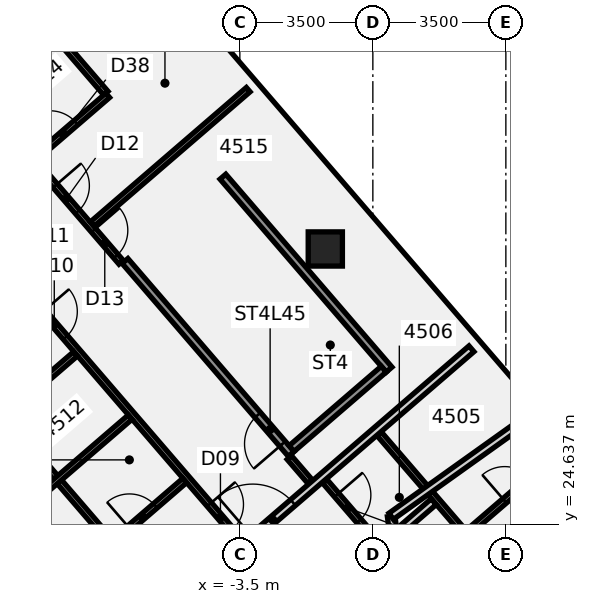
"""IFC4 building model, lengths in metres.
Left out: names, types, materials, properties, quantities, classifications, styles, units other than length and angle.
Written with IfcOpenShell. Run it as: python <this file> out.ifc"""

import sys

from ifc_helpers import new_model, si_unit, direction, frame, frame_2d, origin, origin_2d, place, context, subcontext, project, spatial, polyline, rectangle, outline, extrude, element, fill, save


model = new_model("IFC4")
c1 = context("Model", 3, precision=1e-05, world=origin(), true_north=direction((0.0, 1.0)))
c2 = subcontext(c1, "Body", "Model", "MODEL_VIEW")
j1 = project(units=[si_unit("LENGTHUNIT", "METRE"), si_unit("PLANEANGLEUNIT", "RADIAN")], contexts=[c1])
p1 = place(None, origin())
s1 = spatial("IfcSite", under=j1, at=p1, CompositionType="ELEMENT")
p2 = place(p1, origin())
s2 = spatial("IfcBuilding", under=s1, at=p2, CompositionType="ELEMENT")
p3 = place(p2, frame((0.0, 0.0, 182.5)))
s3 = spatial("IfcBuildingStorey", under=s2, at=p3, CompositionType="ELEMENT", Elevation=182.5)
p4 = place(p3, frame((-1.251, 31.878, -0.135), z_axis=(-0.049929700814, -0.006783926741, 0.99872969482), x_axis=(0.652013787216, -0.757710068374, 0.027449472935)))
e1 = element("IfcColumn", 1, at=p4, inside=s3, PredefinedType="COLUMN", context=c2, shape_type="SweptSolid", body=[
    extrude(rectangle(XDim=0.9, YDim=0.9, at=origin_2d()), origin(), (0.0, 0.0, 1.0), 3.599),
])
p5 = place(p3, frame((-9.706, 27.443, 0.0), z_axis=(0.0, 0.0, 1.0), x_axis=(0.652665803923, -0.757645925475, 0.0)))
e2 = element("IfcWall", 2, at=p5, inside=s3, PredefinedType="PARTITIONING", context=c2, shape_type="SweptSolid", body=[
    extrude(rectangle(XDim=4.34, YDim=0.15, at=frame_2d((2.17, 0.0))), origin(), (0.0, 0.0, 1.0), 2.864),
])
p6 = place(p3, frame((-12.149, 34.262, 0.0), z_axis=(0.0, 0.0, 1.0), x_axis=(0.652651241908, -0.75765846952, 0.0)))
e3 = element("IfcWall", 3, at=p6, inside=s3, PredefinedType="PARTITIONING", context=c2, shape_type="SweptSolid", body=[
    extrude(rectangle(XDim=15.745, YDim=0.15, at=frame_2d((7.873, 0.0))), origin(), (0.0, 0.0, 1.0), 2.864),
])
p7 = place(p6, frame((14.67, 0.0, 0.0)))
e4 = element("IfcOpeningElement", 4, at=p7, cuts=e3, PredefinedType="OPENING", context=c2, shape_type="SweptSolid", body=[
    extrude(rectangle(XDim=1.0, YDim=2.1, at=frame_2d((0.5, 1.05))), frame((0.0, 0.085, 0.0), z_axis=(0.0, -1.0, 0.0), x_axis=(1.0, 0.0, 0.0)), (0.0, 0.0, 1.0), 0.17),
])
p8 = place(p6, frame((12.02, 0.0, 0.0)))
e5 = element("IfcOpeningElement", 5, at=p8, cuts=e3, PredefinedType="OPENING", context=c2, shape_type="SweptSolid", body=[
    extrude(rectangle(XDim=0.9, YDim=2.1, at=frame_2d((0.45, 1.05))), frame((0.0, 0.085, 0.0), z_axis=(0.0, -1.0, 0.0), x_axis=(1.0, 0.0, 0.0)), (0.0, 0.0, 1.0), 0.17),
])
p9 = place(p6, frame((5.32, 0.0, 0.0)))
e6 = element("IfcOpeningElement", 6, at=p9, cuts=e3, PredefinedType="OPENING", context=c2, shape_type="SweptSolid", body=[
    extrude(rectangle(XDim=0.9, YDim=2.1, at=frame_2d((0.45, 1.05))), frame((0.0, 0.085, 0.0), z_axis=(0.0, -1.0, 0.0), x_axis=(1.0, 0.0, 0.0)), (0.0, 0.0, 1.0), 0.17),
])
p10 = place(p6, frame((3.02, 0.0, 0.0)))
e7 = element("IfcOpeningElement", 7, at=p10, cuts=e3, PredefinedType="OPENING", context=c2, shape_type="SweptSolid", body=[
    extrude(rectangle(XDim=0.9, YDim=2.1, at=frame_2d((0.45, 1.05))), frame((0.0, 0.085, 0.0), z_axis=(0.0, -1.0, 0.0), x_axis=(1.0, 0.0, 0.0)), (0.0, 0.0, 1.0), 0.17),
])
p11 = place(p3, frame((-10.331, 35.829, 0.0), z_axis=(0.0, 0.0, 1.0), x_axis=(0.652721930007, -0.757597572652, 0.0)))
e8 = element("IfcWall", 8, at=p11, inside=s3, PredefinedType="PARTITIONING", context=c2, shape_type="SweptSolid", body=[
    extrude(rectangle(XDim=5.68, YDim=0.15, at=frame_2d((2.84, 0.0))), origin(), (0.0, 0.0, 1.0), 2.864),
])
p12 = place(p11, frame((3.02, 0.0, 0.0)))
e9 = element("IfcOpeningElement", 9, at=p12, cuts=e8, PredefinedType="OPENING", context=c2, shape_type="SweptSolid", body=[
    extrude(rectangle(XDim=0.9, YDim=2.1, at=frame_2d((0.45, 1.05))), frame((0.0, 0.085, 0.0), z_axis=(0.0, -1.0, 0.0), x_axis=(1.0, 0.0, 0.0)), (0.0, 0.0, 1.0), 0.17),
])
p13 = place(p11, frame((4.57, 0.0, 0.0)))
e10 = element("IfcOpeningElement", 10, at=p13, cuts=e8, PredefinedType="OPENING", context=c2, shape_type="SweptSolid", body=[
    extrude(rectangle(XDim=0.9, YDim=2.1, at=frame_2d((0.45, 1.05))), frame((0.0, 0.085, 0.0), z_axis=(0.0, -1.0, 0.0), x_axis=(1.0, 0.0, 0.0)), (0.0, 0.0, 1.0), 0.17),
])
p14 = place(p3, frame((-2.198, 26.39, 0.0), z_axis=(0.0, 0.0, 1.0), x_axis=(0.652726981175, -0.757593220697, 0.0)))
e11 = element("IfcWall", 11, at=p14, inside=s3, PredefinedType="PARTITIONING", context=c2, shape_type="SweptSolid", body=[
    extrude(rectangle(XDim=0.84, YDim=0.15, at=frame_2d((0.42, 0.0))), origin(), (0.0, 0.0, 1.0), 2.864),
])
p15 = place(p3, frame((-8.361, 37.526, 0.0), z_axis=(0.0, 0.0, 1.0), x_axis=(0.652696376995, -0.757619587562, 0.0)))
e12 = element("IfcWall", 12, at=p15, inside=s3, PredefinedType="PARTITIONING", context=c2, shape_type="SweptSolid", body=[
    extrude(rectangle(XDim=2.045, YDim=0.15, at=frame_2d((1.023, 0.0))), origin(), (0.0, 0.0, 1.0), 2.864),
])
p16 = place(p3, frame((-1.266, 25.767, 0.0), z_axis=(0.0, 0.0, 1.0), x_axis=(0.652880885414, -0.757460592679, 0.0)))
e13 = element("IfcWall", 13, at=p16, inside=s3, PredefinedType="PARTITIONING", context=c2, shape_type="SweptSolid", body=[
    extrude(rectangle(XDim=2.22, YDim=0.15, at=frame_2d((1.11, 0.0))), origin(), (0.0, 0.0, 1.0), 2.864),
])
p17 = place(p16, frame((0.48, 0.0, 0.0)))
e14 = element("IfcOpeningElement", 14, at=p17, cuts=e13, PredefinedType="OPENING", context=c2, shape_type="SweptSolid", body=[
    extrude(rectangle(XDim=0.9, YDim=2.1, at=frame_2d((0.45, 1.05))), frame((0.0, 0.085, 0.0), z_axis=(0.0, -1.0, 0.0), x_axis=(1.0, 0.0, 0.0)), (0.0, 0.0, 1.0), 0.17),
])
p18 = place(p3, frame((0.173, 27.007, 0.0), z_axis=(0.0, 0.0, 1.0), x_axis=(0.652861605441, -0.757477210311, 0.0)))
e15 = element("IfcWall", 15, at=p18, inside=s3, PredefinedType="PARTITIONING", context=c2, shape_type="SweptSolid", body=[
    extrude(rectangle(XDim=3.405, YDim=0.15, at=frame_2d((1.702, 0.0))), origin(), (0.0, 0.0, 1.0), 2.864),
])
p19 = place(p3, frame((-15.177, 31.759, 0.0), z_axis=(0.0, 0.0, 1.0), x_axis=(0.757593369708, 0.652726808224, 0.0)))
e16 = element("IfcWall", 16, at=p19, inside=s3, PredefinedType="PARTITIONING", context=c2, shape_type="SweptSolid", body=[
    extrude(rectangle(XDim=9.941, YDim=0.15, at=frame_2d((4.97, 0.0))), origin(), (0.0, 0.0, 1.0), 2.864),
])
p20 = place(p19, frame((4.229, 0.0, 0.0)))
e17 = element("IfcOpeningElement", 17, at=p20, cuts=e16, PredefinedType="OPENING", context=c2, shape_type="SweptSolid", body=[
    extrude(rectangle(XDim=1.8, YDim=2.1, at=frame_2d((0.9, 1.05))), frame((0.0, 0.085, 0.0), z_axis=(0.0, -1.0, 0.0), x_axis=(1.0, 0.0, 0.0)), (0.0, 0.0, 1.0), 0.17),
])
p21 = place(p3, frame((-7.385, 32.533, 0.0), z_axis=(0.0, 0.0, 1.0), x_axis=(0.757581269408, 0.652740852286, 0.0)))
e18 = element("IfcWall", 18, at=p21, inside=s3, PredefinedType="PARTITIONING", context=c2, shape_type="SweptSolid", body=[
    extrude(rectangle(XDim=5.419, YDim=0.15, at=frame_2d((2.709, 0.0))), origin(), (0.0, 0.0, 1.0), 2.864),
])
p22 = place(p3, frame((-8.886, 34.275, 0.0), z_axis=(0.0, 0.0, 1.0), x_axis=(0.757661014591, 0.652648287341, 0.0)))
e19 = element("IfcWall", 19, at=p22, inside=s3, PredefinedType="PARTITIONING", context=c2, shape_type="SweptSolid", body=[
    extrude(rectangle(XDim=2.52, YDim=0.15, at=frame_2d((1.26, 0.0))), origin(), (0.0, 0.0, 1.0), 2.864),
])
p23 = place(p22, frame((0.52, 0.0, 0.0)))
e20 = element("IfcOpeningElement", 20, at=p23, cuts=e19, PredefinedType="OPENING", context=c2, shape_type="SweptSolid", body=[
    extrude(rectangle(XDim=0.9, YDim=2.1, at=frame_2d((0.45, 1.05))), frame((0.0, 0.085, 0.0), z_axis=(0.0, -1.0, 0.0), x_axis=(1.0, 0.0, 0.0)), (0.0, 0.0, 1.0), 0.17),
])
p24 = place(p3, frame((-9.24, 24.994, 0.0), z_axis=(0.0, 0.0, 1.0), x_axis=(0.757602279322, 0.652716467056, 0.0)))
e21 = element("IfcWall", 21, at=p24, inside=s3, PredefinedType="PARTITIONING", context=c2, shape_type="SweptSolid", body=[
    extrude(rectangle(XDim=3.766, YDim=0.15, at=frame_2d((1.883, 0.0))), origin(), (0.0, 0.0, 1.0), 2.864),
])
p25 = place(p3, frame((-9.732, 27.474, 0.0), z_axis=(0.0, 0.0, 1.0), x_axis=(0.757495885979, 0.652839936528, 0.0)))
e22 = element("IfcWall", 22, at=p25, inside=s3, PredefinedType="PARTITIONING", context=c2, shape_type="SweptSolid", body=[
    extrude(rectangle(XDim=2.52, YDim=0.15, at=frame_2d((1.26, 0.0))), origin(), (0.0, 0.0, 1.0), 2.864),
])
p26 = place(p25, frame((0.6, 0.0, 0.0)))
e23 = element("IfcOpeningElement", 23, at=p26, cuts=e22, PredefinedType="OPENING", context=c2, shape_type="SweptSolid", body=[
    extrude(rectangle(XDim=0.9, YDim=2.1, at=frame_2d((0.45, 1.05))), frame((0.0, 0.085, 0.0), z_axis=(0.0, -1.0, 0.0), x_axis=(1.0, 0.0, 0.0)), (0.0, 0.0, 1.0), 0.17),
])
p27 = place(p3, frame((-8.177, 19.97, 0.0), z_axis=(0.0, 0.0, 1.0), x_axis=(0.757604641141, 0.652713725704, 0.0)))
e24 = element("IfcWall", 24, at=p27, inside=s3, PredefinedType="PARTITIONING", context=c2, shape_type="SweptSolid", body=[
    extrude(rectangle(XDim=14.219, YDim=0.2, at=frame_2d((7.109, 0.0))), origin(), (0.0, 0.0, 1.0), 2.864),
])
p28 = place(p27, frame((6.621, 0.0, 0.0)))
e25 = element("IfcOpeningElement", 25, at=p28, cuts=e24, PredefinedType="OPENING", context=c2, shape_type="SweptSolid", body=[
    extrude(rectangle(XDim=1.4, YDim=2.1, at=frame_2d((0.7, 1.05))), frame((0.0, 0.11, 0.0), z_axis=(0.0, -1.0, 0.0), x_axis=(1.0, 0.0, 0.0)), (0.0, 0.0, 1.0), 0.22),
])
p29 = place(p3, frame((-6.86, 24.141, 0.0), z_axis=(0.0, 0.0, 1.0), x_axis=(0.757495885979, 0.652839936528, 0.0)))
e26 = element("IfcWall", 26, at=p29, inside=s3, PredefinedType="PARTITIONING", context=c2, shape_type="SweptSolid", body=[
    extrude(rectangle(XDim=2.52, YDim=0.15, at=frame_2d((1.26, 0.0))), origin(), (0.0, 0.0, 1.0), 2.864),
])
p30 = place(p29, frame((0.6, 0.0, 0.0)))
e27 = element("IfcOpeningElement", 27, at=p30, cuts=e26, PredefinedType="OPENING", context=c2, shape_type="SweptSolid", body=[
    extrude(rectangle(XDim=0.9, YDim=2.1, at=frame_2d((0.45, 1.05))), frame((0.0, 0.085, 0.0), z_axis=(0.0, -1.0, 0.0), x_axis=(1.0, 0.0, 0.0)), (0.0, 0.0, 1.0), 0.17),
])
p31 = place(p3, frame((2.445, 24.371, 0.0), z_axis=(0.0, 0.0, 1.0), x_axis=(0.757626487429, 0.652688367865, 0.0)))
e28 = element("IfcWall", 28, at=p31, inside=s3, PredefinedType="PARTITIONING", context=c2, shape_type="SweptSolid", body=[
    extrude(rectangle(XDim=2.922, YDim=0.15, at=frame_2d((1.461, 0.0))), origin(), (0.0, 0.0, 1.0), 2.864),
])
p32 = place(p31, frame((1.35, 0.0, 0.0)))
e29 = element("IfcOpeningElement", 29, at=p32, cuts=e28, PredefinedType="OPENING", context=c2, shape_type="SweptSolid", body=[
    extrude(rectangle(XDim=0.9, YDim=2.1, at=frame_2d((0.45, 1.05))), frame((0.0, 0.085, 0.0), z_axis=(0.0, -1.0, 0.0), x_axis=(1.0, 0.0, 0.0)), (0.0, 0.0, 1.0), 0.17),
])
p33 = place(p3, frame((0.223, 24.04, 0.0), z_axis=(0.0, 0.0, 1.0), x_axis=(0.757558670656, 0.652767079834, 0.0)))
e30 = element("IfcWall", 30, at=p33, inside=s3, PredefinedType="PARTITIONING", context=c2, shape_type="SweptSolid", body=[
    extrude(rectangle(XDim=1.82, YDim=0.2, at=frame_2d((0.91, 0.0))), origin(), (0.0, 0.0, 1.0), 2.864),
])
p34 = place(p3, frame((0.69, 23.257, 0.0), z_axis=(0.0, 0.0, 1.0), x_axis=(-0.130395335876, 0.991462080153, 0.0)))
e31 = element("IfcWall", 31, at=p34, inside=s3, PredefinedType="SOLIDWALL", context=c2, shape_type="SweptSolid", body=[
    extrude(rectangle(XDim=1.601, YDim=0.2, at=frame_2d((0.8, 0.0))), origin(), (0.0, 0.0, 1.0), 3.46),
])
p35 = place(p3, frame((0.482, 24.844, 0.0), z_axis=(0.0, 0.0, 1.0), x_axis=(0.813929369959, 0.580963837702, 0.0)))
e32 = element("IfcWall", 32, at=p35, inside=s3, PredefinedType="SOLIDWALL", context=c2, shape_type="SweptSolid", body=[
    extrude(rectangle(XDim=4.799, YDim=0.2, at=frame_2d((2.399, 0.0))), origin(), (0.0, 0.0, 1.0), 3.46),
])
p36 = place(p3, frame((-2.148, 26.485, -0.14), z_axis=(0.0, 0.0, 1.0), x_axis=(-0.6527428112, 0.75757958158, 0.0)))
e33 = element("IfcWall", 33, at=p36, inside=s3, PredefinedType="SHEAR", context=c2, shape_type="SweptSolid", body=[
    extrude(rectangle(XDim=6.7, YDim=0.2, at=frame_2d((3.35, 0.0))), origin(), (0.0, 0.0, 1.0), 3.004),
])
p37 = place(p36, frame((0.35, 0.0, 0.0)))
e34 = element("IfcOpeningElement", 34, at=p37, cuts=e33, PredefinedType="OPENING", context=c2, shape_type="SweptSolid", body=[
    extrude(rectangle(XDim=1.0, YDim=2.1, at=frame_2d((0.5, 1.05))), frame((0.0, 0.11, 0.0), z_axis=(0.0, -1.0, 0.0), x_axis=(1.0, 0.0, 0.0)), (0.0, 0.0, 1.0), 0.22),
])
p38 = place(p3, frame((0.427, 28.704, -0.14), z_axis=(0.0, 0.0, 1.0), x_axis=(-0.652703877257, 0.757613125952, 0.0)))
e35 = element("IfcWall", 35, at=p38, inside=s3, PredefinedType="SHEAR", context=c2, shape_type="SweptSolid", body=[
    extrude(rectangle(XDim=6.7, YDim=0.2, at=frame_2d((3.35, 0.0))), origin(), (0.0, 0.0, 1.0), 3.004),
])
p39 = place(p3, frame((0.287, 28.715, -0.14), z_axis=(0.0, 0.0, 1.0), x_axis=(-0.757611592596, -0.652705657065, 0.0)))
e36 = element("IfcWall", 36, at=p39, inside=s3, PredefinedType="SHEAR", context=c2, shape_type="SweptSolid", body=[
    extrude(rectangle(XDim=3.2, YDim=0.2, at=frame_2d((1.6, 0.0))), origin(), (0.0, 0.0, 1.0), 3.004),
])
p40 = place(p3, frame((0.0, 0.0, -0.14)))
e37 = element("IfcWall", 37, at=p40, inside=s3, PredefinedType="SHEAR", context=c2, shape_type="SweptSolid", body=[
    extrude(outline(polyline([(-3.891, 33.563), (-4.021, 33.715), (-6.446, 31.626), (-6.315, 31.475), (-3.891, 33.563)])), origin(), (0.0, 0.0, 1.0), 3.004),
])
p41 = place(p8, frame((0.9, 0.0, 0.0), z_axis=(0.0, 0.0, 1.0), x_axis=(-1.0, 0.0, 0.0)))
e38 = element("IfcDoor", 38, at=p41, inside=s3, OperationType="SINGLE_SWING_RIGHT", PredefinedType="DOOR", context=c2, shape_type="SweptSolid", body=[
    extrude(rectangle(XDim=0.9, YDim=2.1, at=frame_2d((0.45, 1.05))), frame((0.0, 0.025, 0.0), z_axis=(0.0, -1.0, 0.0), x_axis=(1.0, 0.0, 0.0)), (0.0, 0.0, 1.0), 0.05),
])
fill(e5, e38)
p42 = place(p9, frame((0.9, 0.0, 0.0), z_axis=(0.0, 0.0, 1.0), x_axis=(-1.0, 0.0, 0.0)))
e39 = element("IfcDoor", 39, at=p42, inside=s3, OperationType="SINGLE_SWING_LEFT", PredefinedType="DOOR", context=c2, shape_type="SweptSolid", body=[
    extrude(rectangle(XDim=0.9, YDim=2.1, at=frame_2d((0.45, 1.05))), frame((0.0, 0.025, 0.0), z_axis=(0.0, -1.0, 0.0), x_axis=(1.0, 0.0, 0.0)), (0.0, 0.0, 1.0), 0.05),
])
fill(e6, e39)
p43 = place(p12, origin())
e40 = element("IfcDoor", 40, at=p43, inside=s3, OperationType="SINGLE_SWING_LEFT", PredefinedType="DOOR", context=c2, shape_type="SweptSolid", body=[
    extrude(rectangle(XDim=0.9, YDim=2.1, at=frame_2d((0.45, 1.05))), frame((0.0, 0.025, 0.0), z_axis=(0.0, -1.0, 0.0), x_axis=(1.0, 0.0, 0.0)), (0.0, 0.0, 1.0), 0.05),
])
fill(e9, e40)
p44 = place(p13, origin())
e41 = element("IfcDoor", 41, at=p44, inside=s3, OperationType="SINGLE_SWING_LEFT", PredefinedType="DOOR", context=c2, shape_type="SweptSolid", body=[
    extrude(rectangle(XDim=0.9, YDim=2.1, at=frame_2d((0.45, 1.05))), frame((0.0, 0.025, 0.0), z_axis=(0.0, -1.0, 0.0), x_axis=(1.0, 0.0, 0.0)), (0.0, 0.0, 1.0), 0.05),
])
fill(e10, e41)
p45 = place(p17, origin())
e42 = element("IfcDoor", 42, at=p45, inside=s3, OperationType="SINGLE_SWING_RIGHT", PredefinedType="DOOR", context=c2, shape_type="SweptSolid", body=[
    extrude(rectangle(XDim=0.9, YDim=2.1, at=frame_2d((0.45, 1.05))), frame((0.0, 0.025, 0.0), z_axis=(0.0, -1.0, 0.0), x_axis=(1.0, 0.0, 0.0)), (0.0, 0.0, 1.0), 0.05),
])
fill(e14, e42)
p46 = place(p23, origin())
e43 = element("IfcDoor", 43, at=p46, inside=s3, OperationType="SINGLE_SWING_RIGHT", PredefinedType="DOOR", context=c2, shape_type="SweptSolid", body=[
    extrude(rectangle(XDim=0.9, YDim=2.1, at=frame_2d((0.45, 1.05))), frame((0.0, 0.025, 0.0), z_axis=(0.0, -1.0, 0.0), x_axis=(1.0, 0.0, 0.0)), (0.0, 0.0, 1.0), 0.05),
])
fill(e20, e43)
p47 = place(p28, frame((1.4, 0.0, 0.0), z_axis=(0.0, 0.0, 1.0), x_axis=(-1.0, 0.0, 0.0)))
e44 = element("IfcDoor", 44, at=p47, inside=s3, OperationType="DOUBLE_DOOR_SINGLE_SWING", PredefinedType="DOOR", context=c2, shape_type="SweptSolid", body=[
    extrude(rectangle(XDim=1.4, YDim=2.1, at=frame_2d((0.7, 1.05))), frame((0.0, 0.025, 0.0), z_axis=(0.0, -1.0, 0.0), x_axis=(1.0, 0.0, 0.0)), (0.0, 0.0, 1.0), 0.05),
])
fill(e25, e44)
p48 = place(p30, origin())
e45 = element("IfcDoor", 45, at=p48, inside=s3, OperationType="SINGLE_SWING_RIGHT", PredefinedType="DOOR", context=c2, shape_type="SweptSolid", body=[
    extrude(rectangle(XDim=0.9, YDim=2.1, at=frame_2d((0.45, 1.05))), frame((0.0, 0.025, 0.0), z_axis=(0.0, -1.0, 0.0), x_axis=(1.0, 0.0, 0.0)), (0.0, 0.0, 1.0), 0.05),
])
fill(e27, e45)
p49 = place(p32, origin())
e46 = element("IfcDoor", 46, at=p49, inside=s3, OperationType="SINGLE_SWING_LEFT", PredefinedType="DOOR", context=c2, shape_type="SweptSolid", body=[
    extrude(rectangle(XDim=0.9, YDim=2.1, at=frame_2d((0.45, 1.05))), frame((0.0, 0.025, 0.0), z_axis=(0.0, -1.0, 0.0), x_axis=(1.0, 0.0, 0.0)), (0.0, 0.0, 1.0), 0.05),
])
fill(e29, e46)
p50 = place(p37, origin())
e47 = element("IfcDoor", 47, at=p50, inside=s3, OperationType="SINGLE_SWING_LEFT", PredefinedType="DOOR", context=c2, shape_type="SweptSolid", body=[
    extrude(rectangle(XDim=1.0, YDim=2.1, at=frame_2d((0.5, 1.05))), frame((0.0, 0.025, 0.0), z_axis=(0.0, -1.0, 0.0), x_axis=(1.0, 0.0, 0.0)), (0.0, 0.0, 1.0), 0.05),
])
fill(e34, e47)
save(model, sys.argv[1])
